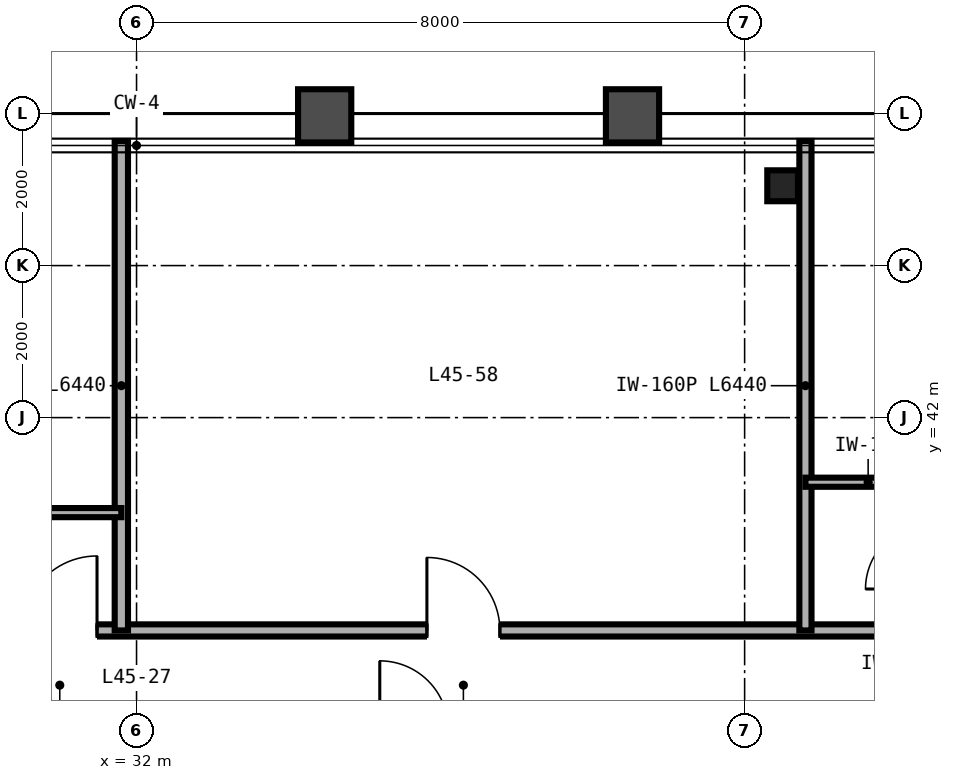
"""IFC4 building model, lengths in metres.
Left out: names, types, materials, properties, quantities, classifications, styles, units other than length and angle.
Written with IfcOpenShell. Run it as: python <this file> out.ifc"""

import sys

from ifc_helpers import new_model, si_unit, direction, frame, frame_2d, origin, origin_2d, place, context, subcontext, project, spatial, rectangle, i_section, extrude, source, transform, mapped, element, fill, save


model = new_model("IFC4")
c1 = context("Model", 3, precision=1e-05, world=origin(), true_north=direction((0.0, 1.0)))
c2 = subcontext(c1, "Body", "Model", "MODEL_VIEW")
j1 = project(units=[si_unit("LENGTHUNIT", "METRE"), si_unit("PLANEANGLEUNIT", "RADIAN")], contexts=[c1])
p1 = place(None, origin())
s1 = spatial("IfcSite", under=j1, at=p1, CompositionType="ELEMENT")
p2 = place(p1, origin())
s2 = spatial("IfcBuilding", under=s1, at=p2, CompositionType="ELEMENT")
p3 = place(p2, frame((0.0, 0.0, 181.2)))
s3 = spatial("IfcBuildingStorey", under=s2, at=p3, CompositionType="ELEMENT", Elevation=181.2)
m1 = source(origin(), c2, "Body", "SweptSolid", [
    extrude(i_section(OverallWidth=0.404, OverallDepth=0.407, WebThickness=0.027, FlangeThickness=0.044, FilletRadius=0.025, at=origin_2d()), origin(), (0.0, 0.0, 1.0), 3.37),
])
p4 = place(p3, frame((40.5, 45.05, 0.0), z_axis=(0.0, 0.0, 1.0), x_axis=(1.0, 0.0, 0.0)))
e1 = element("IfcColumn", 1, at=p4, inside=s3, PredefinedType="COLUMN", context=c2, shape_type="MappedRepresentation", body=[
    mapped(m1, transform((0.0, 0.0, 0.0), scale=1.0)),
])
p5 = place(p3, frame((14.0, 39.2, 0.0), z_axis=(0.0, 0.0, 1.0), x_axis=(1.0, 0.0, 0.0)))
e2 = element("IfcWall", 2, at=p5, inside=s3, PredefinedType="PARTITIONING", context=c2, shape_type="SweptSolid", body=[
    extrude(rectangle(XDim=36.0, YDim=0.16, at=frame_2d((18.0, 0.0))), origin(), (0.0, 0.0, 1.0), 2.913),
])
p6 = place(p5, frame((7.5, 0.0, 0.0)))
e3 = element("IfcOpeningElement", 3, at=p6, cuts=e2, PredefinedType="OPENING", context=c2, shape_type="SweptSolid", body=[
    extrude(rectangle(XDim=0.98, YDim=2.2, at=frame_2d((0.49, 1.1))), frame((0.0, 0.09, 0.0), z_axis=(0.0, -1.0, 0.0), x_axis=(1.0, 0.0, 0.0)), (0.0, 0.0, 1.0), 0.18),
])
p7 = place(p5, frame((16.5, 0.0, 0.0)))
e4 = element("IfcOpeningElement", 4, at=p7, cuts=e2, PredefinedType="OPENING", context=c2, shape_type="SweptSolid", body=[
    extrude(rectangle(XDim=0.98, YDim=2.2, at=frame_2d((0.49, 1.1))), frame((0.0, 0.09, 0.0), z_axis=(0.0, -1.0, 0.0), x_axis=(1.0, 0.0, 0.0)), (0.0, 0.0, 1.0), 0.18),
])
p8 = place(p5, frame((21.82, 0.0, 0.0)))
e5 = element("IfcOpeningElement", 5, at=p8, cuts=e2, PredefinedType="OPENING", context=c2, shape_type="SweptSolid", body=[
    extrude(rectangle(XDim=0.96, YDim=2.15, at=frame_2d((0.48, 1.075))), frame((0.0, 0.09, 0.0), z_axis=(0.0, -1.0, 0.0), x_axis=(1.0, 0.0, 0.0)), (0.0, 0.0, 1.0), 0.18),
])
p9 = place(p5, frame((30.14, 0.0, 0.0)))
e6 = element("IfcOpeningElement", 6, at=p9, cuts=e2, PredefinedType="OPENING", context=c2, shape_type="SweptSolid", body=[
    extrude(rectangle(XDim=0.94, YDim=2.15, at=frame_2d((0.47, 1.075))), frame((0.0, 0.09, 0.0), z_axis=(0.0, -1.0, 0.0), x_axis=(1.0, 0.0, 0.0)), (0.0, 0.0, 1.0), 0.18),
])
p10 = place(p5, frame((34.74, 0.0, 0.0)))
e7 = element("IfcOpeningElement", 7, at=p10, cuts=e2, PredefinedType="OPENING", context=c2, shape_type="SweptSolid", body=[
    extrude(rectangle(XDim=0.94, YDim=2.15, at=frame_2d((0.47, 1.075))), frame((0.0, 0.09, 0.0), z_axis=(0.0, -1.0, 0.0), x_axis=(1.0, 0.0, 0.0)), (0.0, 0.0, 1.0), 0.18),
])
p11 = place(p3, frame((31.8, 39.2, 0.0), z_axis=(0.0, 0.0, 1.0), x_axis=(0.0, 1.0, 0.0)))
e8 = element("IfcWall", 8, at=p11, inside=s3, PredefinedType="PARTITIONING", context=c2, shape_type="SweptSolid", body=[
    extrude(rectangle(XDim=6.44, YDim=0.175, at=frame_2d((3.22, 0.0))), origin(), (0.0, 0.0, 1.0), 2.443),
])
p12 = place(p3, frame((30.7, 40.75, 0.0), z_axis=(0.0, 0.0, 1.0), x_axis=(1.0, 0.0, 0.0)))
e9 = element("IfcWall", 9, at=p12, inside=s3, PredefinedType="PARTITIONING", context=c2, shape_type="SweptSolid", body=[
    extrude(rectangle(XDim=1.1, YDim=0.12, at=frame_2d((0.55, 0.0))), origin(), (0.0, 0.0, 1.0), 3.37),
])
p13 = place(p3, frame((40.8, 39.2, 0.0), z_axis=(0.0, 0.0, 1.0), x_axis=(0.0, 1.0, 0.0)))
e10 = element("IfcWall", 10, at=p13, inside=s3, PredefinedType="PARTITIONING", context=c2, shape_type="SweptSolid", body=[
    extrude(rectangle(XDim=6.44, YDim=0.16, at=frame_2d((3.22, 0.0))), origin(), (0.0, 0.0, 1.0), 2.443),
])
p14 = place(p3, frame((40.8, 41.15, 0.0), z_axis=(0.0, 0.0, 1.0), x_axis=(1.0, 0.0, 0.0)))
e11 = element("IfcWall", 11, at=p14, inside=s3, PredefinedType="PARTITIONING", context=c2, shape_type="SweptSolid", body=[
    extrude(rectangle(XDim=1.65, YDim=0.12, at=frame_2d((0.825, 0.0))), origin(), (0.0, 0.0, 1.0), 3.37),
])
m2 = source(origin(), c2, "Body", "SweptSolid", [
    extrude(rectangle(XDim=0.98, YDim=2.2, at=frame_2d((0.49, 1.1))), frame((0.0, 0.025, 0.0), z_axis=(0.0, -1.0, 0.0), x_axis=(1.0, 0.0, 0.0)), (0.0, 0.0, 1.0), 0.05),
])
p15 = place(p7, origin())
e12 = element("IfcDoor", 12, at=p15, inside=s3, OperationType="SINGLE_SWING_RIGHT", PredefinedType="DOOR", context=c2, shape_type="MappedRepresentation", body=[
    mapped(m2, transform((0.0, 0.0, 0.0), scale=1.0)),
])
fill(e4, e12)
m3 = source(origin(), c2, "Body", "SweptSolid", [
    extrude(rectangle(XDim=0.96, YDim=2.15, at=frame_2d((0.48, 1.075))), frame((0.0, 0.025, 0.0), z_axis=(0.0, -1.0, 0.0), x_axis=(1.0, 0.0, 0.0)), (0.0, 0.0, 1.0), 0.05),
])
p16 = place(p8, origin())
e13 = element("IfcDoor", 13, at=p16, inside=s3, OperationType="SINGLE_SWING_LEFT", PredefinedType="DOOR", context=c2, shape_type="MappedRepresentation", body=[
    mapped(m3, transform((0.0, 0.0, 0.0), scale=1.0)),
])
fill(e5, e13)
save(model, sys.argv[1])
